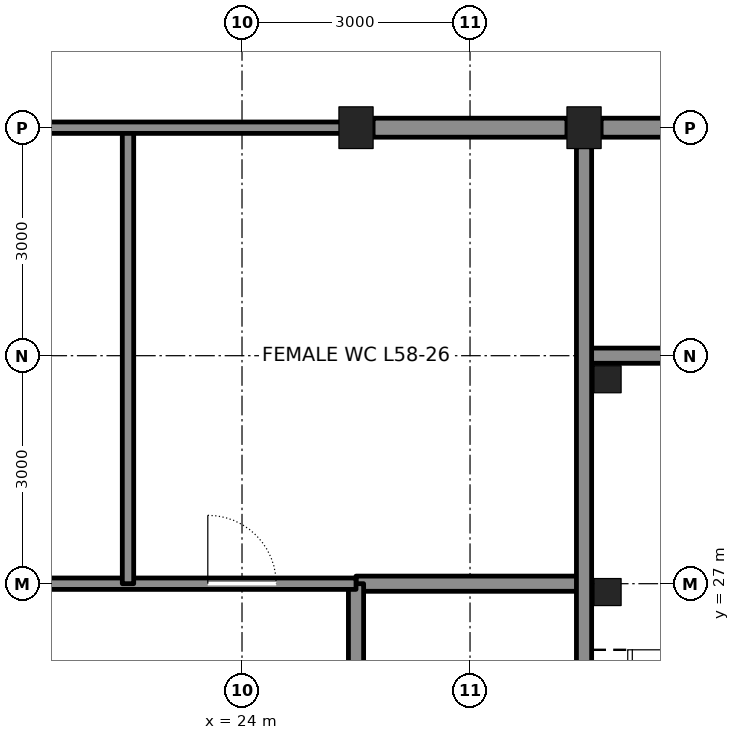
"""IFC4 building model, lengths in metres.
Left out: names, types, materials, properties, quantities, classifications, styles, units other than length and angle.
Written with IfcOpenShell. Run it as: python <this file> out.ifc"""

import sys

from ifc_helpers import new_model, si_unit, direction, frame, frame_2d, origin, origin_2d, place, context, subcontext, project, spatial, rectangle, hollow_rectangle, i_section, extrude, element, fill, save


model = new_model("IFC4")
c1 = context("Model", 3, precision=1e-05, world=origin(), true_north=direction((0.0, 1.0)))
c2 = subcontext(c1, "Body", "Model", "MODEL_VIEW")
j1 = project(units=[si_unit("LENGTHUNIT", "METRE"), si_unit("PLANEANGLEUNIT", "RADIAN")], contexts=[c1])
p1 = place(None, origin())
s1 = spatial("IfcSite", under=j1, at=p1, CompositionType="ELEMENT")
p2 = place(p1, origin())
s2 = spatial("IfcBuilding", under=s1, at=p2, CompositionType="ELEMENT")
p3 = place(p2, frame((0.0, 0.0, 262.2)))
s3 = spatial("IfcBuildingStorey", under=s2, at=p3, CompositionType="ELEMENT", Elevation=262.2)
for number, where, z_axis, x_axis in (
    (1, (25.5, 33.0, 0.0), (0.0, 0.0, 1.0), (1.0, 0.0, 0.0)),
    (2, (28.5, 33.0, 0.0), (0.0, 0.0, 1.0), (1.0, 0.0, 0.0)),
):
    element("IfcColumn", number, at=place(p3, frame(where, z_axis=z_axis, x_axis=x_axis)), inside=s3, PredefinedType="COLUMN", context=c2, shape_type="SweptSolid", body=[
        extrude(i_section(OverallWidth=0.449, OverallDepth=0.549, WebThickness=0.072, FlangeThickness=0.115, at=origin_2d()), origin(), (0.0, 0.0, 1.0), 4.2),
    ])
p4 = place(p3, frame((25.5, 27.0, 0.0), z_axis=(0.0, 0.0, 1.0), x_axis=(1.0, 0.0, 0.0)))
e3 = element("IfcWall", 3, at=p4, inside=s3, PredefinedType="SOLIDWALL", context=c2, shape_type="SweptSolid", body=[
    extrude(rectangle(XDim=3.0, YDim=0.2, at=frame_2d((1.5, 0.0))), origin(), (0.0, 0.0, 1.0), 4.04),
])
p5 = place(p3, frame((28.5, 30.0, 0.0), z_axis=(0.0, 0.0, 1.0), x_axis=(1.0, 0.0, 0.0)))
e4 = element("IfcWall", 4, at=p5, inside=s3, PredefinedType="SOLIDWALL", context=c2, shape_type="SweptSolid", body=[
    extrude(rectangle(XDim=4.5, YDim=0.2, at=frame_2d((2.25, 0.0))), origin(), (0.0, 0.0, 1.0), 4.04),
])
p6 = place(p3, frame((25.725, 33.0, 0.0), z_axis=(0.0, 0.0, 1.0), x_axis=(1.0, 0.0, 0.0)))
e5 = element("IfcWall", 5, at=p6, inside=s3, PredefinedType="SOLIDWALL", context=c2, shape_type="SweptSolid", body=[
    extrude(rectangle(XDim=2.55, YDim=0.25, at=frame_2d((1.275, 0.0))), origin(), (0.0, 0.0, 1.0), 3.182),
])
p7 = place(p3, frame((28.725, 33.0, 0.0), z_axis=(0.0, 0.0, 1.0), x_axis=(1.0, 0.0, 0.0)))
e6 = element("IfcWall", 6, at=p7, inside=s3, PredefinedType="SOLIDWALL", context=c2, shape_type="SweptSolid", body=[
    extrude(rectangle(XDim=4.025, YDim=0.25, at=frame_2d((2.013, 0.0))), origin(), (0.0, 0.0, 1.0), 3.182),
])
p8 = place(p3, frame((25.5, 15.0, 0.0), z_axis=(0.0, 0.0, 1.0), x_axis=(0.0, 1.0, 0.0)))
e7 = element("IfcWall", 7, at=p8, inside=s3, PredefinedType="SOLIDWALL", context=c2, shape_type="SweptSolid", body=[
    extrude(rectangle(XDim=12.0, YDim=0.2, at=frame_2d((6.0, 0.0))), origin(), (0.0, 0.0, 1.0), 3.065),
])
p9 = place(p8, frame((1.8, 0.0, 0.0)))
e8 = element("IfcOpeningElement", 8, at=p9, cuts=e7, PredefinedType="OPENING", context=c2, shape_type="SweptSolid", body=[
    extrude(rectangle(XDim=0.9, YDim=2.1, at=frame_2d((0.45, 1.05))), frame((0.0, 0.11, 0.0), z_axis=(0.0, -1.0, 0.0), x_axis=(1.0, 0.0, 0.0)), (0.0, 0.0, 1.0), 0.22),
])
p10 = place(p8, frame((4.8, 0.0, 0.0)))
e9 = element("IfcOpeningElement", 9, at=p10, cuts=e7, PredefinedType="OPENING", context=c2, shape_type="SweptSolid", body=[
    extrude(rectangle(XDim=0.9, YDim=2.1, at=frame_2d((0.45, 1.05))), frame((0.0, 0.11, 0.0), z_axis=(0.0, -1.0, 0.0), x_axis=(1.0, 0.0, 0.0)), (0.0, 0.0, 1.0), 0.22),
])
p11 = place(p3, frame((28.5, 24.25, 0.0), z_axis=(0.0, 0.0, 1.0), x_axis=(0.0, 1.0, 0.0)))
e10 = element("IfcWall", 10, at=p11, inside=s3, PredefinedType="SOLIDWALL", context=c2, shape_type="SweptSolid", body=[
    extrude(rectangle(XDim=8.5, YDim=0.2, at=frame_2d((4.25, 0.0))), origin(), (0.0, 0.0, 1.0), 3.113),
])
p12 = place(p3, frame((19.5, 27.0, 0.0), z_axis=(0.0, 0.0, 1.0), x_axis=(1.0, 0.0, 0.0)))
e11 = element("IfcWall", 11, at=p12, inside=s3, PredefinedType="PARTITIONING", context=c2, shape_type="SweptSolid", body=[
    extrude(rectangle(XDim=6.0, YDim=0.15, at=frame_2d((3.0, 0.0))), origin(), (0.0, 0.0, 1.0), 4.04),
])
p13 = place(p12, frame((1.05, 0.0, 0.0)))
e12 = element("IfcOpeningElement", 12, at=p13, cuts=e11, PredefinedType="OPENING", context=c2, shape_type="SweptSolid", body=[
    extrude(rectangle(XDim=0.9, YDim=2.1, at=frame_2d((0.45, 1.05))), frame((0.0, 0.085, 0.0), z_axis=(0.0, -1.0, 0.0), x_axis=(1.0, 0.0, 0.0)), (0.0, 0.0, 1.0), 0.17),
])
p14 = place(p12, frame((4.05, 0.0, 0.0)))
e13 = element("IfcOpeningElement", 13, at=p14, cuts=e11, PredefinedType="OPENING", context=c2, shape_type="SweptSolid", body=[
    extrude(rectangle(XDim=0.9, YDim=2.1, at=frame_2d((0.45, 1.05))), frame((0.0, 0.085, 0.0), z_axis=(0.0, -1.0, 0.0), x_axis=(1.0, 0.0, 0.0)), (0.0, 0.0, 1.0), 0.17),
])
p15 = place(p3, frame((22.5, 27.0, 0.0), z_axis=(0.0, 0.0, 1.0), x_axis=(0.0, 1.0, 0.0)))
e14 = element("IfcWall", 14, at=p15, inside=s3, PredefinedType="PARTITIONING", context=c2, shape_type="SweptSolid", body=[
    extrude(rectangle(XDim=6.0, YDim=0.15, at=frame_2d((3.0, 0.0))), origin(), (0.0, 0.0, 1.0), 4.04),
])
p16 = place(p3, frame((19.5, 33.0, 0.0), z_axis=(0.0, 0.0, 1.0), x_axis=(1.0, 0.0, 0.0)))
e15 = element("IfcWall", 15, at=p16, inside=s3, PredefinedType="PARTITIONING", context=c2, shape_type="SweptSolid", body=[
    extrude(rectangle(XDim=6.0, YDim=0.15, at=frame_2d((3.0, 0.0))), origin(), (0.0, 0.0, 1.0), 3.182),
])
for number, where, z_axis, x_axis in (
    (16, (28.81, 29.69, 0.0), (0.0, 0.0, 1.0), (1.0, 0.0, 0.0)),
    (17, (28.81, 26.89, 0.0), (0.0, 0.0, 1.0), (1.0, 0.0, 0.0)),
):
    element("IfcColumn", number, at=place(p3, frame(where, z_axis=z_axis, x_axis=x_axis)), inside=s3, PredefinedType="COLUMN", context=c2, shape_type="SweptSolid", body=[
        extrude(hollow_rectangle(XDim=0.356, YDim=0.356, WallThickness=0.009, at=origin_2d()), origin(), (0.0, 0.0, 1.0), 4.2),
    ])
p17 = place(p14, origin())
e18 = element("IfcDoor", 18, at=p17, inside=s3, OperationType="SINGLE_SWING_LEFT", PredefinedType="DOOR", context=c2, shape_type="SweptSolid", body=[
    extrude(rectangle(XDim=0.9, YDim=2.1, at=frame_2d((0.45, 1.05))), frame((0.0, 0.025, 0.0), z_axis=(0.0, -1.0, 0.0), x_axis=(1.0, 0.0, 0.0)), (0.0, 0.0, 1.0), 0.05),
])
fill(e13, e18)
save(model, sys.argv[1])
